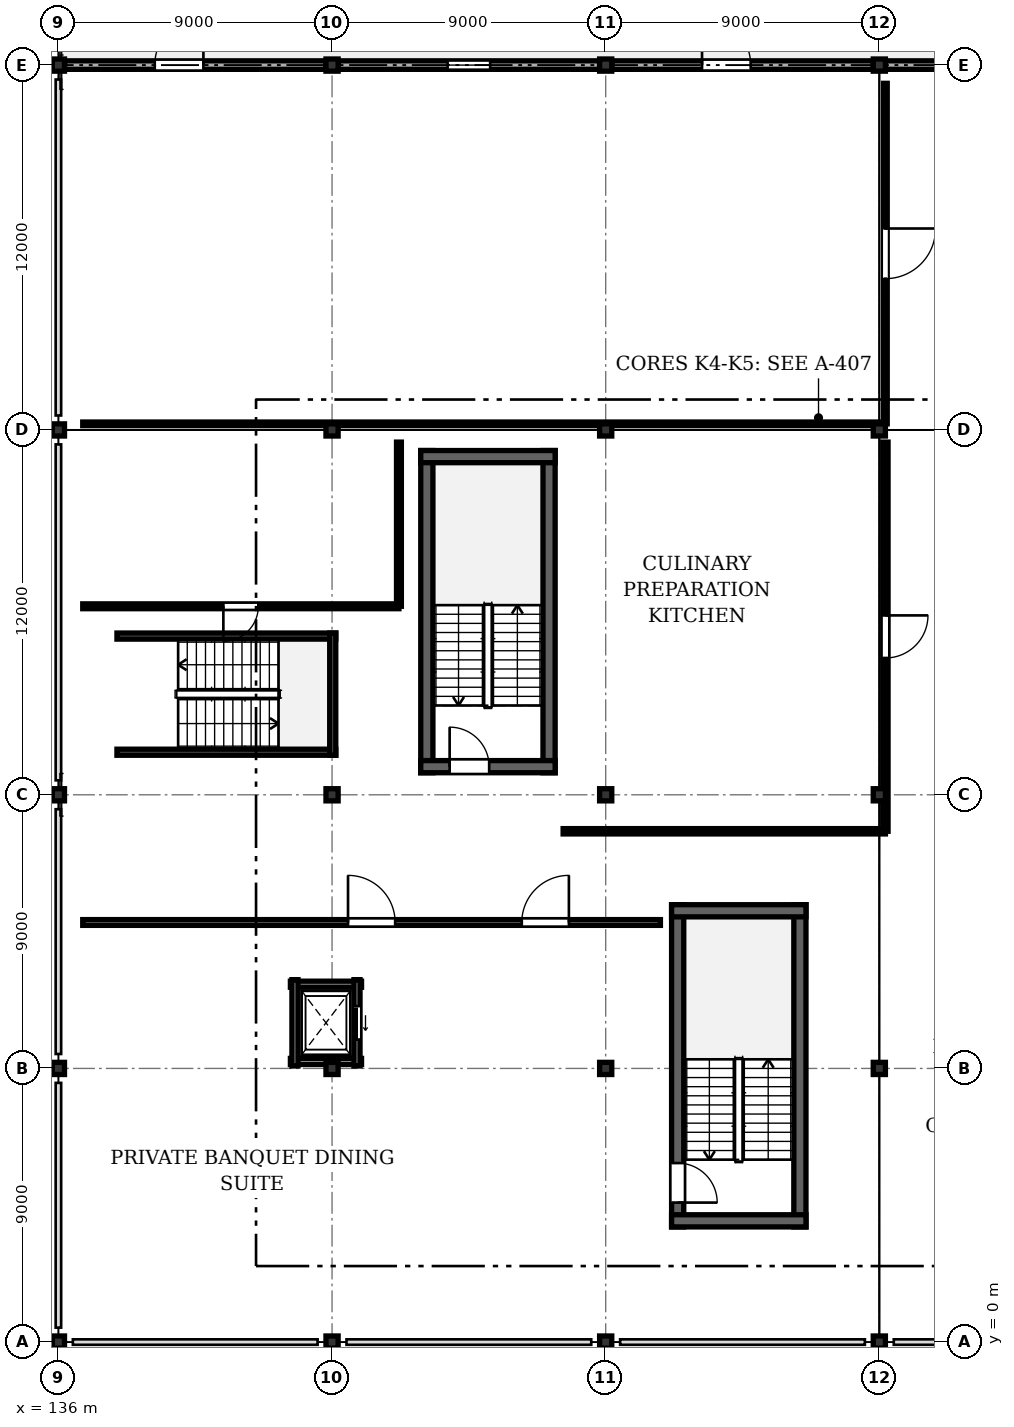
"""IFC4 building model, lengths in metres.
Left out: names, types, materials, properties, quantities, classifications, styles, units other than length and angle.
Written with IfcOpenShell. Run it as: python <this file> out.ifc"""

import sys

from ifc_helpers import new_model, si_unit, direction, frame, frame_2d, origin, origin_2d, place, context, subcontext, project, spatial, rectangle, i_section, extrude, element, fill, save


model = new_model("IFC4")
c1 = context("Model", 3, precision=1e-05, world=origin(), true_north=direction((0.0, 1.0)))
c2 = subcontext(c1, "Body", "Model", "MODEL_VIEW")
j1 = project(units=[si_unit("LENGTHUNIT", "METRE"), si_unit("PLANEANGLEUNIT", "RADIAN")], contexts=[c1])
p1 = place(None, origin())
s1 = spatial("IfcSite", under=j1, at=p1, CompositionType="ELEMENT")
p2 = place(p1, origin())
s2 = spatial("IfcBuilding", under=s1, at=p2, CompositionType="ELEMENT")
p3 = place(p2, frame((0.0, 0.0, 10.8)))
s3 = spatial("IfcBuildingStorey", under=s2, at=p3, CompositionType="ELEMENT", Elevation=10.8)
for number, where, z_axis, x_axis in (
    (1, (136.0, 0.0, 0.0), (0.0, 0.0, 1.0), (1.0, 0.0, 0.0)),
    (2, (136.0, 9.0, 0.0), (0.0, 0.0, 1.0), (1.0, 0.0, 0.0)),
    (3, (136.0, 18.0, 0.0), (0.0, 0.0, 1.0), (1.0, 0.0, 0.0)),
    (4, (136.0, 30.0, 0.0), (0.0, 0.0, 1.0), (1.0, 0.0, 0.0)),
    (5, (136.0, 42.0, 0.0), (0.0, 0.0, 1.0), (1.0, 0.0, 0.0)),
    (6, (145.0, 0.0, 0.0), (0.0, 0.0, 1.0), (1.0, 0.0, 0.0)),
    (7, (145.0, 9.0, 0.0), (0.0, 0.0, 1.0), (1.0, 0.0, 0.0)),
    (8, (145.0, 18.0, 0.0), (0.0, 0.0, 1.0), (1.0, 0.0, 0.0)),
    (9, (145.0, 30.0, 0.0), (0.0, 0.0, 1.0), (1.0, 0.0, 0.0)),
    (10, (145.0, 42.0, 0.0), (0.0, 0.0, 1.0), (1.0, 0.0, 0.0)),
    (11, (154.0, 0.0, 0.0), (0.0, 0.0, 1.0), (1.0, 0.0, 0.0)),
    (12, (154.0, 9.0, 0.0), (0.0, 0.0, 1.0), (1.0, 0.0, 0.0)),
    (13, (154.0, 18.0, 0.0), (0.0, 0.0, 1.0), (1.0, 0.0, 0.0)),
    (14, (154.0, 30.0, 0.0), (0.0, 0.0, 1.0), (1.0, 0.0, 0.0)),
    (15, (154.0, 42.0, 0.0), (0.0, 0.0, 1.0), (1.0, 0.0, 0.0)),
    (16, (163.0, 0.0, 0.0), (0.0, 0.0, 1.0), (1.0, 0.0, 0.0)),
    (17, (163.0, 9.0, 0.0), (0.0, 0.0, 1.0), (1.0, 0.0, 0.0)),
    (18, (163.0, 18.0, 0.0), (0.0, 0.0, 1.0), (1.0, 0.0, 0.0)),
    (19, (163.0, 30.0, 0.0), (0.0, 0.0, 1.0), (1.0, 0.0, 0.0)),
    (20, (163.0, 42.0, 0.0), (0.0, 0.0, 1.0), (1.0, 0.0, 0.0)),
):
    element("IfcColumn", number, at=place(p3, frame(where, z_axis=z_axis, x_axis=x_axis)), inside=s3, PredefinedType="COLUMN", context=c2, shape_type="SweptSolid", body=[
        extrude(i_section(OverallWidth=0.4, OverallDepth=0.4, WebThickness=0.013, FlangeThickness=0.021, FilletRadius=0.022, at=origin_2d()), origin(), (0.0, 0.0, 1.0), 3.6),
    ])
p4 = place(p3, frame((136.2, 42.0, 0.0), z_axis=(0.0, 0.0, 1.0), x_axis=(1.0, 0.0, 0.0)))
e21 = element("IfcWall", 21, at=p4, inside=s3, PredefinedType="SOLIDWALL", context=c2, shape_type="SweptSolid", body=[
    extrude(rectangle(XDim=8.6, YDim=0.28, at=frame_2d((4.3, 0.0))), origin(), (0.0, 0.0, 1.0), 2.795),
])
p5 = place(p4, frame((2.969, 0.0, 0.0)))
e22 = element("IfcOpeningElement", 22, at=p5, cuts=e21, PredefinedType="OPENING", context=c2, shape_type="SweptSolid", body=[
    extrude(rectangle(XDim=1.6, YDim=2.3, at=frame_2d((0.8, 1.15))), frame((0.0, 0.15, 0.0), z_axis=(0.0, -1.0, 0.0), x_axis=(1.0, 0.0, 0.0)), (0.0, 0.0, 1.0), 0.3),
])
p6 = place(p3, frame((145.2, 42.0, 0.0), z_axis=(0.0, 0.0, 1.0), x_axis=(1.0, 0.0, 0.0)))
e23 = element("IfcWall", 23, at=p6, inside=s3, PredefinedType="SOLIDWALL", context=c2, shape_type="SweptSolid", body=[
    extrude(rectangle(XDim=8.6, YDim=0.28, at=frame_2d((4.3, 0.0))), origin(), (0.0, 0.0, 1.0), 2.795),
])
p7 = place(p6, frame((3.6, 0.0, 0.75)))
e24 = element("IfcOpeningElement", 24, at=p7, cuts=e23, PredefinedType="OPENING", context=c2, shape_type="SweptSolid", body=[
    extrude(rectangle(XDim=1.4, YDim=1.55, at=frame_2d((0.7, 0.775))), frame((0.0, 0.15, 0.0), z_axis=(0.0, -1.0, 0.0), x_axis=(1.0, 0.0, 0.0)), (0.0, 0.0, 1.0), 0.3),
])
p8 = place(p3, frame((154.2, 42.0, 0.0), z_axis=(0.0, 0.0, 1.0), x_axis=(1.0, 0.0, 0.0)))
e25 = element("IfcWall", 25, at=p8, inside=s3, PredefinedType="SOLIDWALL", context=c2, shape_type="SweptSolid", body=[
    extrude(rectangle(XDim=8.6, YDim=0.28, at=frame_2d((4.3, 0.0))), origin(), (0.0, 0.0, 1.0), 2.795),
])
p9 = place(p8, frame((2.969, 0.0, 0.0)))
e26 = element("IfcOpeningElement", 26, at=p9, cuts=e25, PredefinedType="OPENING", context=c2, shape_type="SweptSolid", body=[
    extrude(rectangle(XDim=1.6, YDim=2.3, at=frame_2d((0.8, 1.15))), frame((0.0, 0.15, 0.0), z_axis=(0.0, -1.0, 0.0), x_axis=(1.0, 0.0, 0.0)), (0.0, 0.0, 1.0), 0.3),
])
p10 = place(p3, frame((163.2, 42.0, 0.0), z_axis=(0.0, 0.0, 1.0), x_axis=(1.0, 0.0, 0.0)))
e27 = element("IfcWall", 27, at=p10, inside=s3, PredefinedType="SOLIDWALL", context=c2, shape_type="SweptSolid", body=[
    extrude(rectangle(XDim=8.6, YDim=0.28, at=frame_2d((4.3, 0.0))), origin(), (0.0, 0.0, 1.0), 2.795),
])
p11 = place(p10, frame((3.6, 0.0, 0.75)))
e28 = element("IfcOpeningElement", 28, at=p11, cuts=e27, PredefinedType="OPENING", context=c2, shape_type="SweptSolid", body=[
    extrude(rectangle(XDim=1.4, YDim=1.55, at=frame_2d((0.7, 0.775))), frame((0.0, 0.15, 0.0), z_axis=(0.0, -1.0, 0.0), x_axis=(1.0, 0.0, 0.0)), (0.0, 0.0, 1.0), 0.3),
])
for number, where, z_axis, x_axis in (
    (29, (152.137, 18.725, 0.0), (0.0, 0.0, 1.0), (0.0, 1.0, 0.0)),
    (30, (148.117, 29.323, 0.0), (0.0, 0.0, 1.0), (0.0, -1.0, 0.0)),
):
    element("IfcWall", number, at=place(p3, frame(where, z_axis=z_axis, x_axis=x_axis)), inside=s3, PredefinedType="SHEAR", context=c2, shape_type="SweptSolid", body=[
        extrude(rectangle(XDim=10.597, YDim=0.4, at=frame_2d((5.299, 0.0))), origin(), (0.0, 0.0, 1.0), 3.4),
    ])
p12 = place(p3, frame((152.337, 29.123, 0.0), z_axis=(0.0, 0.0, 1.0), x_axis=(-1.0, 0.0, 0.0)))
e31 = element("IfcWall", 31, at=p12, inside=s3, PredefinedType="SHEAR", context=c2, shape_type="SweptSolid", body=[
    extrude(rectangle(XDim=4.42, YDim=0.4, at=frame_2d((2.21, 0.0))), origin(), (0.0, 0.0, 1.0), 3.4),
])
p13 = place(p3, frame((147.917, 18.925, 0.0), z_axis=(0.0, 0.0, 1.0), x_axis=(1.0, 0.0, 0.0)))
e32 = element("IfcWall", 32, at=p13, inside=s3, PredefinedType="SHEAR", context=c2, shape_type="SweptSolid", body=[
    extrude(rectangle(XDim=4.42, YDim=0.4, at=frame_2d((2.21, 0.0))), origin(), (0.0, 0.0, 1.0), 3.4),
])
p14 = place(p13, frame((0.95, 0.0, 0.0)))
e33 = element("IfcOpeningElement", 33, at=p14, cuts=e32, PredefinedType="OPENING", context=c2, shape_type="SweptSolid", body=[
    extrude(rectangle(XDim=1.3, YDim=2.1, at=frame_2d((0.65, 1.05))), frame((0.0, 0.21, 0.0), z_axis=(0.0, -1.0, 0.0), x_axis=(1.0, 0.0, 0.0)), (0.0, 0.0, 1.0), 0.42),
])
p15 = place(p3, frame((160.387, 3.788, 0.0), z_axis=(0.0, 0.0, 1.0), x_axis=(0.0, 1.0, 0.0)))
e34 = element("IfcWall", 34, at=p15, inside=s3, PredefinedType="SHEAR", context=c2, shape_type="SweptSolid", body=[
    extrude(rectangle(XDim=10.597, YDim=0.4, at=frame_2d((5.299, 0.0))), origin(), (0.0, 0.0, 1.0), 3.4),
])
p16 = place(p3, frame((156.367, 14.385, 0.0), z_axis=(0.0, 0.0, 1.0), x_axis=(0.0, -1.0, 0.0)))
e35 = element("IfcWall", 35, at=p16, inside=s3, PredefinedType="SHEAR", context=c2, shape_type="SweptSolid", body=[
    extrude(rectangle(XDim=10.597, YDim=0.4, at=frame_2d((5.299, 0.0))), origin(), (0.0, 0.0, 1.0), 3.4),
])
p17 = place(p16, frame((8.498, 0.0, 0.0)))
e36 = element("IfcOpeningElement", 36, at=p17, cuts=e35, PredefinedType="OPENING", context=c2, shape_type="SweptSolid", body=[
    extrude(rectangle(XDim=1.3, YDim=2.1, at=frame_2d((0.65, 1.05))), frame((0.0, 0.21, 0.0), z_axis=(0.0, -1.0, 0.0), x_axis=(1.0, 0.0, 0.0)), (0.0, 0.0, 1.0), 0.42),
])
for number, where, z_axis, x_axis in (
    (37, (160.587, 14.185, 0.0), (0.0, 0.0, 1.0), (-1.0, 0.0, 0.0)),
    (38, (156.167, 3.988, 0.0), (0.0, 0.0, 1.0), (1.0, 0.0, 0.0)),
):
    element("IfcWall", number, at=place(p3, frame(where, z_axis=z_axis, x_axis=x_axis)), inside=s3, PredefinedType="SHEAR", context=c2, shape_type="SweptSolid", body=[
        extrude(rectangle(XDim=4.42, YDim=0.4, at=frame_2d((2.21, 0.0))), origin(), (0.0, 0.0, 1.0), 3.4),
    ])
for number, where, z_axis, x_axis in (
    (39, (137.925, 19.4, 0.0), (0.0, 0.0, 1.0), (1.0, 0.0, 0.0)),
    (40, (145.123, 23.22, 0.0), (0.0, 0.0, 1.0), (-1.0, 0.0, 0.0)),
):
    element("IfcWall", number, at=place(p3, frame(where, z_axis=z_axis, x_axis=x_axis)), inside=s3, PredefinedType="SOLIDWALL", context=c2, shape_type="SweptSolid", body=[
        extrude(rectangle(XDim=7.198, YDim=0.2, at=frame_2d((3.599, 0.0))), origin(), (0.0, 0.0, 1.0), 3.4),
    ])
p18 = place(p3, frame((145.022, 19.3, 0.0), z_axis=(0.0, 0.0, 1.0), x_axis=(0.0, 1.0, 0.0)))
e41 = element("IfcWall", 41, at=p18, inside=s3, PredefinedType="SOLIDWALL", context=c2, shape_type="SweptSolid", body=[
    extrude(rectangle(XDim=4.02, YDim=0.2, at=frame_2d((2.01, 0.0))), origin(), (0.0, 0.0, 1.0), 3.4),
])
p19 = place(p3, frame((143.63, 9.23, 0.0), z_axis=(0.0, 0.0, 1.0), x_axis=(1.0, 0.0, 0.0)))
e42 = element("IfcWall", 42, at=p19, inside=s3, PredefinedType="SOLIDWALL", context=c2, shape_type="SweptSolid", body=[
    extrude(rectangle(XDim=2.34, YDim=0.2, at=frame_2d((1.17, 0.0))), origin(), (0.0, 0.0, 1.0), 2.935),
])
p20 = place(p3, frame((145.97, 11.77, 0.0), z_axis=(0.0, 0.0, 1.0), x_axis=(-1.0, 0.0, 0.0)))
e43 = element("IfcWall", 43, at=p20, inside=s3, PredefinedType="SOLIDWALL", context=c2, shape_type="SweptSolid", body=[
    extrude(rectangle(XDim=2.34, YDim=0.2, at=frame_2d((1.17, 0.0))), origin(), (0.0, 0.0, 1.0), 3.375),
])
p21 = place(p3, frame((143.78, 11.92, 0.0), z_axis=(0.0, 0.0, 1.0), x_axis=(0.0, -1.0, 0.0)))
e44 = element("IfcWall", 44, at=p21, inside=s3, PredefinedType="SOLIDWALL", context=c2, shape_type="SweptSolid", body=[
    extrude(rectangle(XDim=2.84, YDim=0.2, at=frame_2d((1.42, 0.0))), origin(), (0.0, 0.0, 1.0), 2.935),
])
p22 = place(p3, frame((145.82, 9.08, 0.0), z_axis=(0.0, 0.0, 1.0), x_axis=(0.0, 1.0, 0.0)))
e45 = element("IfcWall", 45, at=p22, inside=s3, PredefinedType="SOLIDWALL", context=c2, shape_type="SweptSolid", body=[
    extrude(rectangle(XDim=2.84, YDim=0.2, at=frame_2d((1.42, 0.0))), origin(), (0.0, 0.0, 1.0), 2.935),
])
p23 = place(p22, frame((0.87, 0.0, 0.0)))
e46 = element("IfcOpeningElement", 46, at=p23, cuts=e45, PredefinedType="OPENING", context=c2, shape_type="SweptSolid", body=[
    extrude(rectangle(XDim=1.1, YDim=2.15, at=frame_2d((0.55, 1.075))), frame((0.0, 0.11, 0.0), z_axis=(0.0, -1.0, 0.0), x_axis=(1.0, 0.0, 0.0)), (0.0, 0.0, 1.0), 0.22),
])
p24 = place(p3, frame((163.2, 30.2, 0.0), z_axis=(0.0, 0.0, 1.0), x_axis=(-1.0, 0.0, 0.0)))
e47 = element("IfcWall", 47, at=p24, inside=s3, PredefinedType="PARTITIONING", context=c2, shape_type="SweptSolid", body=[
    extrude(rectangle(XDim=26.4, YDim=0.12, at=frame_2d((13.2, 0.0))), origin(), (0.0, 0.0, 1.0), 2.795),
])
p25 = place(p3, frame((163.2, 41.4, 0.0), z_axis=(0.0, 0.0, 1.0), x_axis=(0.0, -1.0, 0.0)))
e48 = element("IfcWall", 48, at=p25, inside=s3, PredefinedType="PARTITIONING", context=c2, shape_type="SweptSolid", body=[
    extrude(rectangle(XDim=11.2, YDim=0.12, at=frame_2d((5.6, 0.0))), origin(), (0.0, 0.0, 1.0), 2.795),
])
p26 = place(p25, frame((4.775, 0.0, 0.0)))
e49 = element("IfcOpeningElement", 49, at=p26, cuts=e48, PredefinedType="OPENING", context=c2, shape_type="SweptSolid", body=[
    extrude(rectangle(XDim=1.65, YDim=2.1, at=frame_2d((0.825, 1.05))), frame((0.0, 0.07, 0.0), z_axis=(0.0, -1.0, 0.0), x_axis=(1.0, 0.0, 0.0)), (0.0, 0.0, 1.0), 0.14),
])
p27 = place(p3, frame((136.8, 13.8, 0.0), z_axis=(0.0, 0.0, 1.0), x_axis=(1.0, 0.0, 0.0)))
e50 = element("IfcWall", 50, at=p27, inside=s3, PredefinedType="PARTITIONING", context=c2, shape_type="SweptSolid", body=[
    extrude(rectangle(XDim=19.0, YDim=0.19, at=frame_2d((9.5, 0.0))), origin(), (0.0, 0.0, 1.0), 2.985),
])
p28 = place(p27, frame((8.725, 0.0, 0.0)))
e51 = element("IfcOpeningElement", 51, at=p28, cuts=e50, PredefinedType="OPENING", context=c2, shape_type="SweptSolid", body=[
    extrude(rectangle(XDim=1.55, YDim=2.1, at=frame_2d((0.775, 1.05))), frame((0.0, 0.105, 0.0), z_axis=(0.0, -1.0, 0.0), x_axis=(1.0, 0.0, 0.0)), (0.0, 0.0, 1.0), 0.21),
])
p29 = place(p27, frame((14.44, 0.0, 0.0)))
e52 = element("IfcOpeningElement", 52, at=p29, cuts=e50, PredefinedType="OPENING", context=c2, shape_type="SweptSolid", body=[
    extrude(rectangle(XDim=1.55, YDim=2.1, at=frame_2d((0.775, 1.05))), frame((0.0, 0.105, 0.0), z_axis=(0.0, -1.0, 0.0), x_axis=(1.0, 0.0, 0.0)), (0.0, 0.0, 1.0), 0.21),
])
p30 = place(p3, frame((163.2, 16.8, 0.0), z_axis=(0.0, 0.0, 1.0), x_axis=(-1.0, 0.0, 0.0)))
e53 = element("IfcWall", 53, at=p30, inside=s3, PredefinedType="PARTITIONING", context=c2, shape_type="SweptSolid", body=[
    extrude(rectangle(XDim=10.6, YDim=0.175, at=frame_2d((5.3, 0.0))), origin(), (0.0, 0.0, 1.0), 2.985),
])
p31 = place(p3, frame((163.2, 29.6, 0.0), z_axis=(0.0, 0.0, 1.0), x_axis=(0.0, -1.0, 0.0)))
e54 = element("IfcWall", 54, at=p31, inside=s3, PredefinedType="PARTITIONING", context=c2, shape_type="SweptSolid", body=[
    extrude(rectangle(XDim=12.8, YDim=0.175, at=frame_2d((6.4, 0.0))), origin(), (0.0, 0.0, 1.0), 2.795),
])
p32 = place(p31, frame((5.7, 0.0, 0.0)))
e55 = element("IfcOpeningElement", 55, at=p32, cuts=e54, PredefinedType="OPENING", context=c2, shape_type="SweptSolid", body=[
    extrude(rectangle(XDim=1.4, YDim=2.1, at=frame_2d((0.7, 1.05))), frame((0.0, 0.097, 0.0), z_axis=(0.0, -1.0, 0.0), x_axis=(1.0, 0.0, 0.0)), (0.0, 0.0, 1.0), 0.195),
])
p33 = place(p3, frame((147.2, 24.2, 0.0), z_axis=(0.0, 0.0, 1.0), x_axis=(-1.0, 0.0, 0.0)))
e56 = element("IfcWall", 56, at=p33, inside=s3, PredefinedType="PARTITIONING", context=c2, shape_type="SweptSolid", body=[
    extrude(rectangle(XDim=10.4, YDim=0.16, at=frame_2d((5.2, 0.0))), origin(), (0.0, 0.0, 1.0), 2.825),
])
p34 = place(p33, frame((4.625, 0.0, 0.0)))
e57 = element("IfcOpeningElement", 57, at=p34, cuts=e56, PredefinedType="OPENING", context=c2, shape_type="SweptSolid", body=[
    extrude(rectangle(XDim=1.15, YDim=2.1, at=frame_2d((0.575, 1.05))), frame((0.0, 0.09, 0.0), z_axis=(0.0, -1.0, 0.0), x_axis=(1.0, 0.0, 0.0)), (0.0, 0.0, 1.0), 0.18),
])
p35 = place(p3, frame((147.2, 29.6, 0.0), z_axis=(0.0, 0.0, 1.0), x_axis=(0.0, -1.0, 0.0)))
e58 = element("IfcWall", 58, at=p35, inside=s3, PredefinedType="PARTITIONING", context=c2, shape_type="SweptSolid", body=[
    extrude(rectangle(XDim=5.4, YDim=0.16, at=frame_2d((2.7, 0.0))), origin(), (0.0, 0.0, 1.0), 2.905),
])
p36 = place(p5, origin())
e59 = element("IfcDoor", 59, at=p36, inside=s3, OperationType="SINGLE_SWING_RIGHT", PredefinedType="DOOR", context=c2, shape_type="SweptSolid", body=[
    extrude(rectangle(XDim=1.6, YDim=2.3, at=frame_2d((0.8, 1.15))), frame((0.0, 0.025, 0.0), z_axis=(0.0, -1.0, 0.0), x_axis=(1.0, 0.0, 0.0)), (0.0, 0.0, 1.0), 0.05),
])
fill(e22, e59)
p37 = place(p7, origin())
e60 = element("IfcWindow", 60, at=p37, inside=s3, PartitioningType="SINGLE_PANEL", PredefinedType="WINDOW", context=c2, shape_type="SweptSolid", body=[
    extrude(rectangle(XDim=1.4, YDim=1.55, at=frame_2d((0.7, 0.775))), frame((0.0, 0.03, 0.0), z_axis=(0.0, -1.0, 0.0), x_axis=(1.0, 0.0, 0.0)), (0.0, 0.0, 1.0), 0.06),
])
fill(e24, e60)
p38 = place(p9, origin())
e61 = element("IfcDoor", 61, at=p38, inside=s3, OperationType="SINGLE_SWING_LEFT", PredefinedType="DOOR", context=c2, shape_type="SweptSolid", body=[
    extrude(rectangle(XDim=1.6, YDim=2.3, at=frame_2d((0.8, 1.15))), frame((0.0, 0.025, 0.0), z_axis=(0.0, -1.0, 0.0), x_axis=(1.0, 0.0, 0.0)), (0.0, 0.0, 1.0), 0.05),
])
fill(e26, e61)
p39 = place(p14, origin())
e62 = element("IfcDoor", 62, at=p39, inside=s3, OperationType="SINGLE_SWING_LEFT", PredefinedType="DOOR", context=c2, shape_type="SweptSolid", body=[
    extrude(rectangle(XDim=1.3, YDim=2.1, at=frame_2d((0.65, 1.05))), frame((0.0, 0.025, 0.0), z_axis=(0.0, -1.0, 0.0), x_axis=(1.0, 0.0, 0.0)), (0.0, 0.0, 1.0), 0.05),
])
fill(e33, e62)
p40 = place(p17, origin())
e63 = element("IfcDoor", 63, at=p40, inside=s3, OperationType="SINGLE_SWING_RIGHT", PredefinedType="DOOR", context=c2, shape_type="SweptSolid", body=[
    extrude(rectangle(XDim=1.3, YDim=2.1, at=frame_2d((0.65, 1.05))), frame((0.0, 0.025, 0.0), z_axis=(0.0, -1.0, 0.0), x_axis=(1.0, 0.0, 0.0)), (0.0, 0.0, 1.0), 0.05),
])
fill(e36, e63)
p41 = place(p23, origin())
e64 = element("IfcDoor", 64, at=p41, inside=s3, OperationType="SLIDING_TO_LEFT", PredefinedType="DOOR", context=c2, shape_type="SweptSolid", body=[
    extrude(rectangle(XDim=1.1, YDim=2.15, at=frame_2d((0.55, 1.075))), frame((0.0, 0.025, 0.0), z_axis=(0.0, -1.0, 0.0), x_axis=(1.0, 0.0, 0.0)), (0.0, 0.0, 1.0), 0.05),
])
fill(e46, e64)
p42 = place(p26, origin())
e65 = element("IfcDoor", 65, at=p42, inside=s3, OperationType="SINGLE_SWING_LEFT", PredefinedType="DOOR", context=c2, shape_type="SweptSolid", body=[
    extrude(rectangle(XDim=1.65, YDim=2.1, at=frame_2d((0.825, 1.05))), frame((0.0, 0.025, 0.0), z_axis=(0.0, -1.0, 0.0), x_axis=(1.0, 0.0, 0.0)), (0.0, 0.0, 1.0), 0.05),
])
fill(e49, e65)
p43 = place(p28, origin())
e66 = element("IfcDoor", 66, at=p43, inside=s3, OperationType="SINGLE_SWING_LEFT", PredefinedType="DOOR", context=c2, shape_type="SweptSolid", body=[
    extrude(rectangle(XDim=1.55, YDim=2.1, at=frame_2d((0.775, 1.05))), frame((0.0, 0.025, 0.0), z_axis=(0.0, -1.0, 0.0), x_axis=(1.0, 0.0, 0.0)), (0.0, 0.0, 1.0), 0.05),
])
fill(e51, e66)
p44 = place(p29, origin())
e67 = element("IfcDoor", 67, at=p44, inside=s3, OperationType="SINGLE_SWING_RIGHT", PredefinedType="DOOR", context=c2, shape_type="SweptSolid", body=[
    extrude(rectangle(XDim=1.55, YDim=2.1, at=frame_2d((0.775, 1.05))), frame((0.0, 0.025, 0.0), z_axis=(0.0, -1.0, 0.0), x_axis=(1.0, 0.0, 0.0)), (0.0, 0.0, 1.0), 0.05),
])
fill(e52, e67)
p45 = place(p32, origin())
e68 = element("IfcDoor", 68, at=p45, inside=s3, OperationType="SINGLE_SWING_LEFT", PredefinedType="DOOR", context=c2, shape_type="SweptSolid", body=[
    extrude(rectangle(XDim=1.4, YDim=2.1, at=frame_2d((0.7, 1.05))), frame((0.0, 0.025, 0.0), z_axis=(0.0, -1.0, 0.0), x_axis=(1.0, 0.0, 0.0)), (0.0, 0.0, 1.0), 0.05),
])
fill(e55, e68)
p46 = place(p34, origin())
e69 = element("IfcDoor", 69, at=p46, inside=s3, OperationType="SINGLE_SWING_RIGHT", PredefinedType="DOOR", context=c2, shape_type="SweptSolid", body=[
    extrude(rectangle(XDim=1.15, YDim=2.1, at=frame_2d((0.575, 1.05))), frame((0.0, 0.025, 0.0), z_axis=(0.0, -1.0, 0.0), x_axis=(1.0, 0.0, 0.0)), (0.0, 0.0, 1.0), 0.05),
])
fill(e57, e69)
save(model, sys.argv[1])
